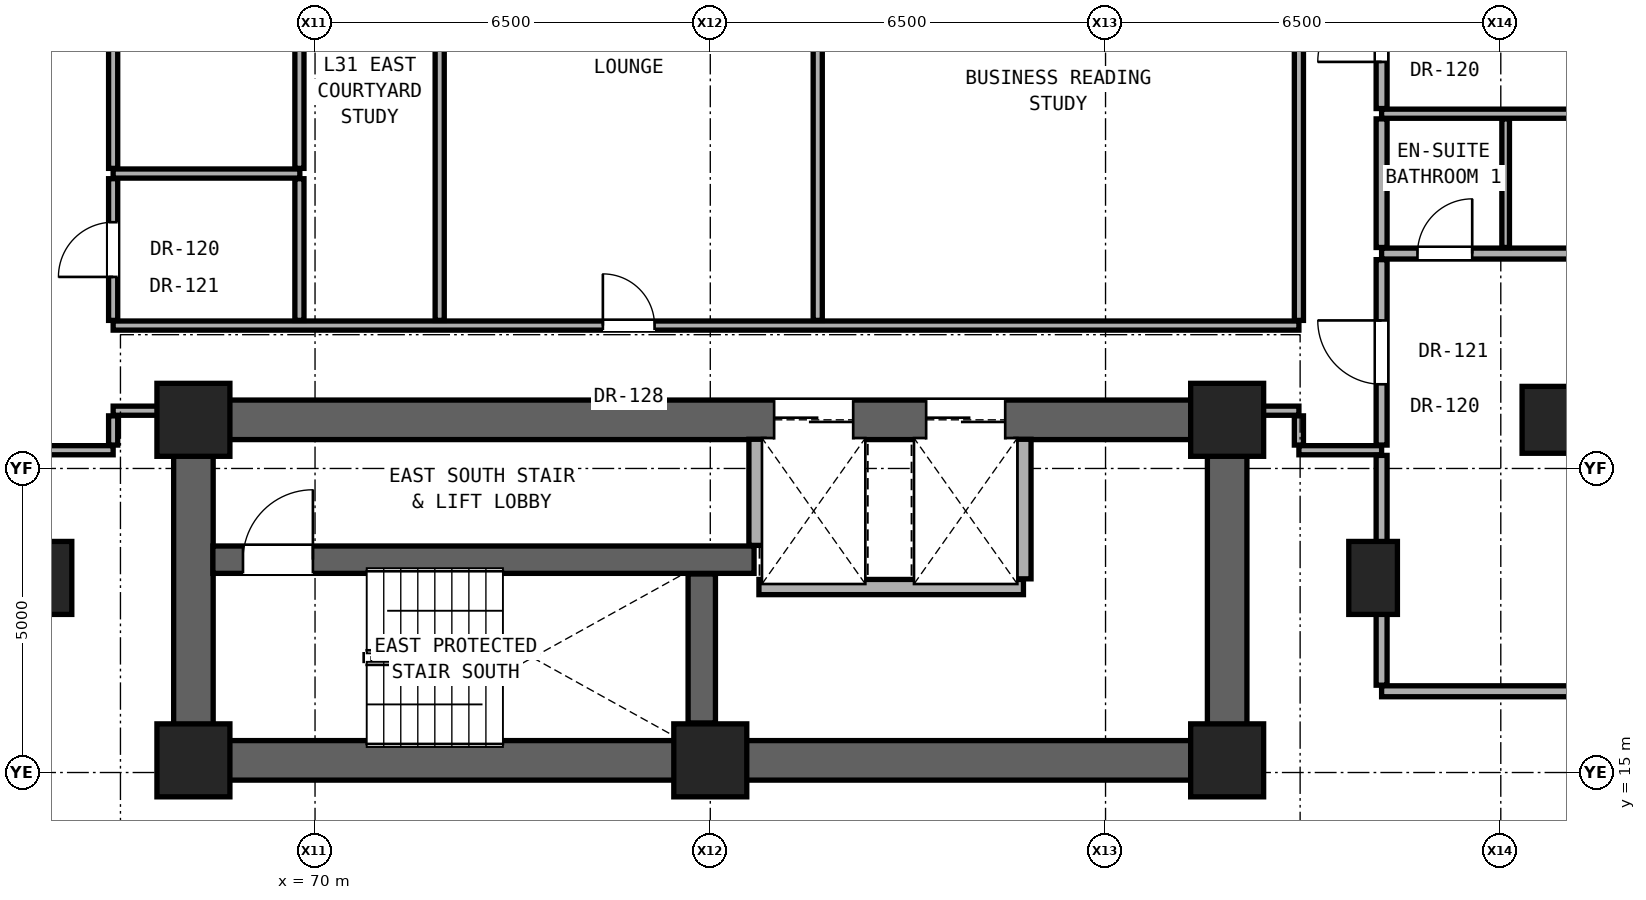
"""IFC4 building model, lengths in metres.
Left out: names, types, materials, properties, quantities, classifications, styles, units other than length and angle.
Written with IfcOpenShell. Run it as: python <this file> out.ifc"""

import sys

from ifc_helpers import new_model, si_unit, direction, frame, frame_2d, origin, origin_2d, place, context, subcontext, project, spatial, rectangle, hollow_rectangle, extrude, element, fill, save


model = new_model("IFC4")
c1 = context("Model", 3, precision=1e-05, world=origin(), true_north=direction((0.0, 1.0)))
c2 = subcontext(c1, "Body", "Model", "MODEL_VIEW")
j1 = project(units=[si_unit("LENGTHUNIT", "METRE"), si_unit("PLANEANGLEUNIT", "RADIAN")], contexts=[c1])
p1 = place(None, origin())
s1 = spatial("IfcSite", under=j1, at=p1, CompositionType="ELEMENT")
p2 = place(p1, origin())
s2 = spatial("IfcBuilding", under=s1, at=p2, CompositionType="ELEMENT")
p3 = place(p2, frame((0.0, 0.0, 111.5)))
s3 = spatial("IfcBuildingStorey", under=s2, at=p3, CompositionType="ELEMENT", Elevation=111.5)
for number, where, z_axis, x_axis in (
    (1, (68.0, 15.2, 0.0), (0.0, 0.0, 1.0), (1.0, 0.0, 0.0)),
    (2, (76.5, 15.2, 0.0), (0.0, 0.0, 1.0), (1.0, 0.0, 0.0)),
    (3, (85.0, 15.2, 0.0), (0.0, 0.0, 1.0), (1.0, 0.0, 0.0)),
    (4, (68.0, 20.8, 0.0), (0.0, 0.0, 1.0), (1.0, 0.0, 0.0)),
    (5, (85.0, 20.8, 0.0), (0.0, 0.0, 1.0), (1.0, 0.0, 0.0)),
):
    element("IfcColumn", number, at=place(p3, frame(where, z_axis=z_axis, x_axis=x_axis)), inside=s3, PredefinedType="COLUMN", context=c2, shape_type="SweptSolid", body=[
        extrude(rectangle(XDim=1.2, YDim=1.2, at=origin_2d()), origin(), (0.0, 0.0, 1.0), 3.3),
    ])
p4 = place(p3, frame((90.4, 20.8, 0.0), z_axis=(0.0, 0.0, 1.0), x_axis=(1.0, 0.0, 0.0)))
e6 = element("IfcColumn", 6, at=p4, inside=s3, PredefinedType="COLUMN", context=c2, shape_type="SweptSolid", body=[
    extrude(hollow_rectangle(XDim=1.1, YDim=1.1, WallThickness=0.06, at=origin_2d()), origin(), (0.0, 0.0, 1.0), 3.3),
])
for number, where, z_axis, x_axis in (
    (7, (65.6, 18.2, 0.0), (0.0, 0.0, 1.0), (1.0, 0.0, 0.0)),
    (8, (87.4, 18.2, 0.0), (0.0, 0.0, 1.0), (1.0, 0.0, 0.0)),
):
    element("IfcColumn", number, at=place(p3, frame(where, z_axis=z_axis, x_axis=x_axis)), inside=s3, PredefinedType="PILASTER", context=c2, shape_type="SweptSolid", body=[
        extrude(rectangle(XDim=0.8, YDim=1.2, at=origin_2d()), origin(), (0.0, 0.0, 1.0), 3.3),
    ])
p5 = place(p3, frame((68.0, 15.2, 0.0), z_axis=(0.0, 0.0, 1.0), x_axis=(1.0, 0.0, 0.0)))
e9 = element("IfcWall", 9, at=p5, inside=s3, PredefinedType="SHEAR", context=c2, shape_type="SweptSolid", body=[
    extrude(rectangle(XDim=17.0, YDim=0.65, at=frame_2d((8.5, 0.0))), origin(), (0.0, 0.0, 1.0), 3.08),
])
for number, where, z_axis, x_axis in (
    (10, (68.0, 15.2, 0.0), (0.0, 0.0, 1.0), (0.0, 1.0, 0.0)),
    (11, (85.0, 15.2, 0.0), (0.0, 0.0, 1.0), (0.0, 1.0, 0.0)),
):
    element("IfcWall", number, at=place(p3, frame(where, z_axis=z_axis, x_axis=x_axis)), inside=s3, PredefinedType="SHEAR", context=c2, shape_type="SweptSolid", body=[
        extrude(rectangle(XDim=5.6, YDim=0.65, at=frame_2d((2.8, 0.0))), origin(), (0.0, 0.0, 1.0), 3.08),
    ])
p6 = place(p3, frame((68.0, 20.8, 0.0), z_axis=(0.0, 0.0, 1.0), x_axis=(1.0, 0.0, 0.0)))
e12 = element("IfcWall", 12, at=p6, inside=s3, PredefinedType="SHEAR", context=c2, shape_type="SweptSolid", body=[
    extrude(rectangle(XDim=17.0, YDim=0.65, at=frame_2d((8.5, 0.0))), origin(), (0.0, 0.0, 1.0), 3.08),
])
p7 = place(p6, frame((9.55, 0.0, 0.0)))
e13 = element("IfcOpeningElement", 13, at=p7, cuts=e12, PredefinedType="OPENING", context=c2, shape_type="SweptSolid", body=[
    extrude(rectangle(XDim=1.3, YDim=2.3, at=frame_2d((0.65, 1.15))), frame((0.0, 0.335, 0.0), z_axis=(0.0, -1.0, 0.0), x_axis=(1.0, 0.0, 0.0)), (0.0, 0.0, 1.0), 0.67),
])
p8 = place(p6, frame((12.05, 0.0, 0.0)))
e14 = element("IfcOpeningElement", 14, at=p8, cuts=e12, PredefinedType="OPENING", context=c2, shape_type="SweptSolid", body=[
    extrude(rectangle(XDim=1.3, YDim=2.3, at=frame_2d((0.65, 1.15))), frame((0.0, 0.335, 0.0), z_axis=(0.0, -1.0, 0.0), x_axis=(1.0, 0.0, 0.0)), (0.0, 0.0, 1.0), 0.67),
])
p9 = place(p3, frame((87.54, 16.336, 0.0), z_axis=(0.0, 0.0, 1.0), x_axis=(1.0, 0.0, 0.0)))
e15 = element("IfcWall", 15, at=p9, inside=s3, PredefinedType="PARTITIONING", context=c2, shape_type="SweptSolid", body=[
    extrude(rectangle(XDim=3.232, YDim=0.18, at=frame_2d((1.616, 0.0))), origin(), (0.0, 0.0, 1.0), 3.08),
])
p10 = place(p3, frame((77.3, 18.05, 0.0), z_axis=(0.0, 0.0, 1.0), x_axis=(1.0, 0.0, 0.0)))
e16 = element("IfcWall", 16, at=p10, inside=s3, PredefinedType="SOLIDWALL", context=c2, shape_type="SweptSolid", body=[
    extrude(rectangle(XDim=4.35, YDim=0.25, at=frame_2d((2.175, 0.0))), origin(), (0.0, 0.0, 1.0), 3.08),
])
p11 = place(p3, frame((68.32, 18.5, 0.0), z_axis=(0.0, 0.0, 1.0), x_axis=(1.0, 0.0, 0.0)))
e17 = element("IfcWall", 17, at=p11, inside=s3, PredefinedType="SHEAR", context=c2, shape_type="SweptSolid", body=[
    extrude(rectangle(XDim=8.9, YDim=0.45, at=frame_2d((4.45, 0.0))), origin(), (0.0, 0.0, 1.0), 3.08),
])
p12 = place(p11, frame((0.495, 0.0, 0.0)))
e18 = element("IfcOpeningElement", 18, at=p12, cuts=e17, PredefinedType="OPENING", context=c2, shape_type="SweptSolid", body=[
    extrude(rectangle(XDim=1.15, YDim=2.2, at=frame_2d((0.575, 1.1))), frame((0.0, 0.235, 0.0), z_axis=(0.0, -1.0, 0.0), x_axis=(1.0, 0.0, 0.0)), (0.0, 0.0, 1.0), 0.47),
])
p13 = place(p3, frame((65.32, 20.3, 0.0), z_axis=(0.0, 0.0, 1.0), x_axis=(1.0, 0.0, 0.0)))
e19 = element("IfcWall", 19, at=p13, inside=s3, PredefinedType="PARTITIONING", context=c2, shape_type="SweptSolid", body=[
    extrude(rectangle(XDim=1.36, YDim=0.15, at=frame_2d((0.68, 0.0))), origin(), (0.0, 0.0, 1.0), 3.08),
])
p14 = place(p3, frame((86.18, 20.3, 0.0), z_axis=(0.0, 0.0, 1.0), x_axis=(1.0, 0.0, 0.0)))
e20 = element("IfcWall", 20, at=p14, inside=s3, PredefinedType="PARTITIONING", context=c2, shape_type="SweptSolid", body=[
    extrude(rectangle(XDim=1.36, YDim=0.15, at=frame_2d((0.68, 0.0))), origin(), (0.0, 0.0, 1.0), 3.08),
])
p15 = place(p3, frame((66.68, 20.95, 0.0), z_axis=(0.0, 0.0, 1.0), x_axis=(1.0, 0.0, 0.0)))
e21 = element("IfcWall", 21, at=p15, inside=s3, PredefinedType="PARTITIONING", context=c2, shape_type="SweptSolid", body=[
    extrude(rectangle(XDim=1.0, YDim=0.15, at=frame_2d((0.5, 0.0))), origin(), (0.0, 0.0, 1.0), 2.472),
])
p16 = place(p3, frame((85.32, 20.95, 0.0), z_axis=(0.0, 0.0, 1.0), x_axis=(1.0, 0.0, 0.0)))
e22 = element("IfcWall", 22, at=p16, inside=s3, PredefinedType="PARTITIONING", context=c2, shape_type="SweptSolid", body=[
    extrude(rectangle(XDim=0.86, YDim=0.15, at=frame_2d((0.43, 0.0))), origin(), (0.0, 0.0, 1.0), 2.472),
])
p17 = place(p3, frame((66.68, 22.35, 0.0), z_axis=(0.0, 0.0, 1.0), x_axis=(1.0, 0.0, 0.0)))
e23 = element("IfcWall", 23, at=p17, inside=s3, PredefinedType="PARTITIONING", context=c2, shape_type="SweptSolid", body=[
    extrude(rectangle(XDim=19.5, YDim=0.15, at=frame_2d((9.75, 0.0))), origin(), (0.0, 0.0, 1.0), 2.145),
])
p18 = place(p17, frame((8.053, 0.0, 0.0)))
e24 = element("IfcOpeningElement", 24, at=p18, cuts=e23, PredefinedType="OPENING", context=c2, shape_type="SweptSolid", body=[
    extrude(rectangle(XDim=0.85, YDim=2.01, at=frame_2d((0.425, 1.005))), frame((0.0, 0.085, 0.0), z_axis=(0.0, -1.0, 0.0), x_axis=(1.0, 0.0, 0.0)), (0.0, 0.0, 1.0), 0.17),
])
p19 = place(p3, frame((87.54, 23.534, 0.0), z_axis=(0.0, 0.0, 1.0), x_axis=(1.0, 0.0, 0.0)))
e25 = element("IfcWall", 25, at=p19, inside=s3, PredefinedType="PARTITIONING", context=c2, shape_type="SweptSolid", body=[
    extrude(rectangle(XDim=7.768, YDim=0.18, at=frame_2d((3.884, 0.0))), origin(), (0.0, 0.0, 1.0), 2.216),
])
p20 = place(p19, frame((4.409, 0.0, 0.0)))
e26 = element("IfcOpeningElement", 26, at=p20, cuts=e25, PredefinedType="OPENING", context=c2, shape_type="SweptSolid", body=[
    extrude(rectangle(XDim=0.95, YDim=2.15, at=frame_2d((0.475, 1.075))), frame((0.0, 0.1, 0.0), z_axis=(0.0, -1.0, 0.0), x_axis=(1.0, 0.0, 0.0)), (0.0, 0.0, 1.0), 0.2),
])
p21 = place(p19, frame((0.59, 0.0, 0.0)))
e27 = element("IfcOpeningElement", 27, at=p21, cuts=e25, PredefinedType="OPENING", context=c2, shape_type="SweptSolid", body=[
    extrude(rectangle(XDim=0.9, YDim=2.1, at=frame_2d((0.45, 1.05))), frame((0.0, 0.1, 0.0), z_axis=(0.0, -1.0, 0.0), x_axis=(1.0, 0.0, 0.0)), (0.0, 0.0, 1.0), 0.2),
])
p22 = place(p3, frame((66.68, 24.85, 0.0), z_axis=(0.0, 0.0, 1.0), x_axis=(1.0, 0.0, 0.0)))
e28 = element("IfcWall", 28, at=p22, inside=s3, PredefinedType="PARTITIONING", context=c2, shape_type="SweptSolid", body=[
    extrude(rectangle(XDim=3.07, YDim=0.15, at=frame_2d((1.535, 0.0))), origin(), (0.0, 0.0, 1.0), 2.145),
])
p23 = place(p3, frame((87.54, 25.834, 0.0), z_axis=(0.0, 0.0, 1.0), x_axis=(1.0, 0.0, 0.0)))
e29 = element("IfcWall", 29, at=p23, inside=s3, PredefinedType="PARTITIONING", context=c2, shape_type="SweptSolid", body=[
    extrude(rectangle(XDim=7.768, YDim=0.15, at=frame_2d((3.884, 0.0))), origin(), (0.0, 0.0, 1.0), 2.216),
])
p24 = place(p3, frame((66.68, 20.385, 0.0), z_axis=(0.0, 0.0, 1.0), x_axis=(0.0, 1.0, 0.0)))
e30 = element("IfcWall", 30, at=p24, inside=s3, PredefinedType="PARTITIONING", context=c2, shape_type="SweptSolid", body=[
    extrude(rectangle(XDim=0.48, YDim=0.15, at=frame_2d((0.24, 0.0))), origin(), (0.0, 0.0, 1.0), 2.472),
])
p25 = place(p3, frame((66.68, 22.435, 0.0), z_axis=(0.0, 0.0, 1.0), x_axis=(0.0, 1.0, 0.0)))
e31 = element("IfcWall", 31, at=p25, inside=s3, PredefinedType="PARTITIONING", context=c2, shape_type="SweptSolid", body=[
    extrude(rectangle(XDim=2.33, YDim=0.15, at=frame_2d((1.165, 0.0))), origin(), (0.0, 0.0, 1.0), 3.08),
])
p26 = place(p25, frame((0.715, 0.0, 0.0)))
e32 = element("IfcOpeningElement", 32, at=p26, cuts=e31, PredefinedType="OPENING", context=c2, shape_type="SweptSolid", body=[
    extrude(rectangle(XDim=0.9, YDim=2.1, at=frame_2d((0.45, 1.05))), frame((0.0, 0.085, 0.0), z_axis=(0.0, -1.0, 0.0), x_axis=(1.0, 0.0, 0.0)), (0.0, 0.0, 1.0), 0.17),
])
p27 = place(p3, frame((66.68, 24.935, 0.0), z_axis=(0.0, 0.0, 1.0), x_axis=(0.0, 1.0, 0.0)))
e33 = element("IfcWall", 33, at=p27, inside=s3, PredefinedType="PARTITIONING", context=c2, shape_type="SweptSolid", body=[
    extrude(rectangle(XDim=5.63, YDim=0.15, at=frame_2d((2.815, 0.0))), origin(), (0.0, 0.0, 1.0), 2.299),
])
p28 = place(p27, frame((2.34, 0.0, 0.0)))
e34 = element("IfcOpeningElement", 34, at=p28, cuts=e33, PredefinedType="OPENING", context=c2, shape_type="SweptSolid", body=[
    extrude(rectangle(XDim=0.95, YDim=2.15, at=frame_2d((0.475, 1.075))), frame((0.0, 0.085, 0.0), z_axis=(0.0, -1.0, 0.0), x_axis=(1.0, 0.0, 0.0)), (0.0, 0.0, 1.0), 0.17),
])
p29 = place(p3, frame((69.743, 22.435, 0.0), z_axis=(0.0, 0.0, 1.0), x_axis=(0.0, 1.0, 0.0)))
e35 = element("IfcWall", 35, at=p29, inside=s3, PredefinedType="PARTITIONING", context=c2, shape_type="SweptSolid", body=[
    extrude(rectangle(XDim=2.33, YDim=0.15, at=frame_2d((1.165, 0.0))), origin(), (0.0, 0.0, 1.0), 3.08),
])
p30 = place(p3, frame((69.743, 24.935, 0.0), z_axis=(0.0, 0.0, 1.0), x_axis=(0.0, 1.0, 0.0)))
e36 = element("IfcWall", 36, at=p30, inside=s3, PredefinedType="PARTITIONING", context=c2, shape_type="SweptSolid", body=[
    extrude(rectangle(XDim=5.63, YDim=0.15, at=frame_2d((2.815, 0.0))), origin(), (0.0, 0.0, 1.0), 2.145),
])
p31 = place(p3, frame((72.05, 22.435, 0.0), z_axis=(0.0, 0.0, 1.0), x_axis=(0.0, 1.0, 0.0)))
e37 = element("IfcWall", 37, at=p31, inside=s3, PredefinedType="PARTITIONING", context=c2, shape_type="SweptSolid", body=[
    extrude(rectangle(XDim=8.13, YDim=0.15, at=frame_2d((4.065, 0.0))), origin(), (0.0, 0.0, 1.0), 2.145),
])
p32 = place(p3, frame((76.36, 15.815, 0.0), z_axis=(0.0, 0.0, 1.0), x_axis=(0.0, 1.0, 0.0)))
e38 = element("IfcWall", 38, at=p32, inside=s3, PredefinedType="SHEAR", context=c2, shape_type="SweptSolid", body=[
    extrude(rectangle(XDim=2.45, YDim=0.45, at=frame_2d((1.225, 0.0))), origin(), (0.0, 0.0, 1.0), 3.08),
])
p33 = place(p3, frame((77.26, 18.735, 0.0), z_axis=(0.0, 0.0, 1.0), x_axis=(0.0, 1.0, 0.0)))
e39 = element("IfcWall", 39, at=p33, inside=s3, PredefinedType="SOLIDWALL", context=c2, shape_type="SweptSolid", body=[
    extrude(rectangle(XDim=1.745, YDim=0.25, at=frame_2d((0.873, 0.0))), origin(), (0.0, 0.0, 1.0), 3.08),
])
p34 = place(p3, frame((78.267, 22.435, 0.0), z_axis=(0.0, 0.0, 1.0), x_axis=(0.0, 1.0, 0.0)))
e40 = element("IfcWall", 40, at=p34, inside=s3, PredefinedType="PARTITIONING", context=c2, shape_type="SweptSolid", body=[
    extrude(rectangle(XDim=8.13, YDim=0.15, at=frame_2d((4.065, 0.0))), origin(), (0.0, 0.0, 1.0), 2.145),
])
p35 = place(p3, frame((81.65, 18.185, 0.0), z_axis=(0.0, 0.0, 1.0), x_axis=(0.0, 1.0, 0.0)))
e41 = element("IfcWall", 41, at=p35, inside=s3, PredefinedType="SOLIDWALL", context=c2, shape_type="SweptSolid", body=[
    extrude(rectangle(XDim=2.295, YDim=0.25, at=frame_2d((1.147, 0.0))), origin(), (0.0, 0.0, 1.0), 3.08),
])
p36 = place(p3, frame((86.18, 20.385, 0.0), z_axis=(0.0, 0.0, 1.0), x_axis=(0.0, 1.0, 0.0)))
e42 = element("IfcWall", 42, at=p36, inside=s3, PredefinedType="PARTITIONING", context=c2, shape_type="SweptSolid", body=[
    extrude(rectangle(XDim=0.48, YDim=0.15, at=frame_2d((0.24, 0.0))), origin(), (0.0, 0.0, 1.0), 2.472),
])
p37 = place(p3, frame((86.18, 22.435, 0.0), z_axis=(0.0, 0.0, 1.0), x_axis=(0.0, 1.0, 0.0)))
e43 = element("IfcWall", 43, at=p37, inside=s3, PredefinedType="PARTITIONING", context=c2, shape_type="SweptSolid", body=[
    extrude(rectangle(XDim=8.13, YDim=0.15, at=frame_2d((4.065, 0.0))), origin(), (0.0, 0.0, 1.0), 2.299),
])
p38 = place(p3, frame((87.54, 16.436, 0.0), z_axis=(0.0, 0.0, 1.0), x_axis=(0.0, 1.0, 0.0)))
e44 = element("IfcWall", 44, at=p38, inside=s3, PredefinedType="PARTITIONING", context=c2, shape_type="SweptSolid", body=[
    extrude(rectangle(XDim=3.779, YDim=0.18, at=frame_2d((1.89, 0.0))), origin(), (0.0, 0.0, 1.0), 2.456),
])
p39 = place(p3, frame((87.54, 20.385, 0.0), z_axis=(0.0, 0.0, 1.0), x_axis=(0.0, 1.0, 0.0)))
e45 = element("IfcWall", 45, at=p39, inside=s3, PredefinedType="PARTITIONING", context=c2, shape_type="SweptSolid", body=[
    extrude(rectangle(XDim=3.049, YDim=0.18, at=frame_2d((1.524, 0.0))), origin(), (0.0, 0.0, 1.0), 2.472),
])
p40 = place(p39, frame((1.0, 0.0, 0.0)))
e46 = element("IfcOpeningElement", 46, at=p40, cuts=e45, PredefinedType="OPENING", context=c2, shape_type="SweptSolid", body=[
    extrude(rectangle(XDim=1.05, YDim=2.2, at=frame_2d((0.525, 1.1))), frame((0.0, 0.1, 0.0), z_axis=(0.0, -1.0, 0.0), x_axis=(1.0, 0.0, 0.0)), (0.0, 0.0, 1.0), 0.2),
])
p41 = place(p3, frame((87.54, 23.634, 0.0), z_axis=(0.0, 0.0, 1.0), x_axis=(0.0, 1.0, 0.0)))
e47 = element("IfcWall", 47, at=p41, inside=s3, PredefinedType="PARTITIONING", context=c2, shape_type="SweptSolid", body=[
    extrude(rectangle(XDim=2.115, YDim=0.18, at=frame_2d((1.058, 0.0))), origin(), (0.0, 0.0, 1.0), 3.08),
])
p42 = place(p3, frame((87.54, 25.919, 0.0), z_axis=(0.0, 0.0, 1.0), x_axis=(0.0, 1.0, 0.0)))
e48 = element("IfcWall", 48, at=p42, inside=s3, PredefinedType="PARTITIONING", context=c2, shape_type="SweptSolid", body=[
    extrude(rectangle(XDim=2.584, YDim=0.18, at=frame_2d((1.292, 0.0))), origin(), (0.0, 0.0, 1.0), 2.299),
])
p43 = place(p42, frame((0.767, 0.0, 0.0)))
e49 = element("IfcOpeningElement", 49, at=p43, cuts=e48, PredefinedType="OPENING", context=c2, shape_type="SweptSolid", body=[
    extrude(rectangle(XDim=1.05, YDim=2.2, at=frame_2d((0.525, 1.1))), frame((0.0, 0.1, 0.0), z_axis=(0.0, -1.0, 0.0), x_axis=(1.0, 0.0, 0.0)), (0.0, 0.0, 1.0), 0.2),
])
p44 = place(p3, frame((89.58, 23.634, 0.0), z_axis=(0.0, 0.0, 1.0), x_axis=(0.0, 1.0, 0.0)))
e50 = element("IfcWall", 50, at=p44, inside=s3, PredefinedType="PARTITIONING", context=c2, shape_type="SweptSolid", body=[
    extrude(rectangle(XDim=2.115, YDim=0.125, at=frame_2d((1.058, 0.0))), origin(), (0.0, 0.0, 1.0), 3.08),
])
p45 = place(p12, origin())
e51 = element("IfcDoor", 51, at=p45, inside=s3, OperationType="SINGLE_SWING_RIGHT", PredefinedType="DOOR", context=c2, shape_type="SweptSolid", body=[
    extrude(rectangle(XDim=1.15, YDim=2.2, at=frame_2d((0.575, 1.1))), frame((0.0, 0.025, 0.0), z_axis=(0.0, -1.0, 0.0), x_axis=(1.0, 0.0, 0.0)), (0.0, 0.0, 1.0), 0.05),
])
fill(e18, e51)
p46 = place(p26, origin())
e52 = element("IfcDoor", 52, at=p46, inside=s3, OperationType="SINGLE_SWING_LEFT", PredefinedType="DOOR", context=c2, shape_type="SweptSolid", body=[
    extrude(rectangle(XDim=0.9, YDim=2.1, at=frame_2d((0.45, 1.05))), frame((0.0, 0.025, 0.0), z_axis=(0.0, -1.0, 0.0), x_axis=(1.0, 0.0, 0.0)), (0.0, 0.0, 1.0), 0.05),
])
fill(e32, e52)
p47 = place(p40, origin())
e53 = element("IfcDoor", 53, at=p47, inside=s3, OperationType="SINGLE_SWING_RIGHT", PredefinedType="DOOR", context=c2, shape_type="SweptSolid", body=[
    extrude(rectangle(XDim=1.05, YDim=2.2, at=frame_2d((0.525, 1.1))), frame((0.0, 0.025, 0.0), z_axis=(0.0, -1.0, 0.0), x_axis=(1.0, 0.0, 0.0)), (0.0, 0.0, 1.0), 0.05),
])
fill(e46, e53)
p48 = place(p21, origin())
e54 = element("IfcDoor", 54, at=p48, inside=s3, OperationType="SINGLE_SWING_RIGHT", PredefinedType="DOOR", context=c2, shape_type="SweptSolid", body=[
    extrude(rectangle(XDim=0.9, YDim=2.1, at=frame_2d((0.45, 1.05))), frame((0.0, 0.025, 0.0), z_axis=(0.0, -1.0, 0.0), x_axis=(1.0, 0.0, 0.0)), (0.0, 0.0, 1.0), 0.05),
])
fill(e27, e54)
p49 = place(p43, origin())
e55 = element("IfcDoor", 55, at=p49, inside=s3, OperationType="SINGLE_SWING_LEFT", PredefinedType="DOOR", context=c2, shape_type="SweptSolid", body=[
    extrude(rectangle(XDim=1.05, YDim=2.2, at=frame_2d((0.525, 1.1))), frame((0.0, 0.025, 0.0), z_axis=(0.0, -1.0, 0.0), x_axis=(1.0, 0.0, 0.0)), (0.0, 0.0, 1.0), 0.05),
])
fill(e49, e55)
p50 = place(p18, origin())
e56 = element("IfcDoor", 56, at=p50, inside=s3, OperationType="SINGLE_SWING_LEFT", PredefinedType="DOOR", context=c2, shape_type="SweptSolid", body=[
    extrude(rectangle(XDim=0.85, YDim=2.01, at=frame_2d((0.425, 1.005))), frame((0.0, 0.025, 0.0), z_axis=(0.0, -1.0, 0.0), x_axis=(1.0, 0.0, 0.0)), (0.0, 0.0, 1.0), 0.05),
])
fill(e24, e56)
p51 = place(p7, origin())
e57 = element("IfcDoor", 57, at=p51, inside=s3, OperationType="DOUBLE_DOOR_SLIDING", PredefinedType="DOOR", context=c2, shape_type="SweptSolid", body=[
    extrude(rectangle(XDim=1.3, YDim=2.3, at=frame_2d((0.65, 1.15))), frame((0.0, 0.025, 0.0), z_axis=(0.0, -1.0, 0.0), x_axis=(1.0, 0.0, 0.0)), (0.0, 0.0, 1.0), 0.05),
])
fill(e13, e57)
p52 = place(p8, origin())
e58 = element("IfcDoor", 58, at=p52, inside=s3, OperationType="DOUBLE_DOOR_SLIDING", PredefinedType="DOOR", context=c2, shape_type="SweptSolid", body=[
    extrude(rectangle(XDim=1.3, YDim=2.3, at=frame_2d((0.65, 1.15))), frame((0.0, 0.025, 0.0), z_axis=(0.0, -1.0, 0.0), x_axis=(1.0, 0.0, 0.0)), (0.0, 0.0, 1.0), 0.05),
])
fill(e14, e58)
save(model, sys.argv[1])
